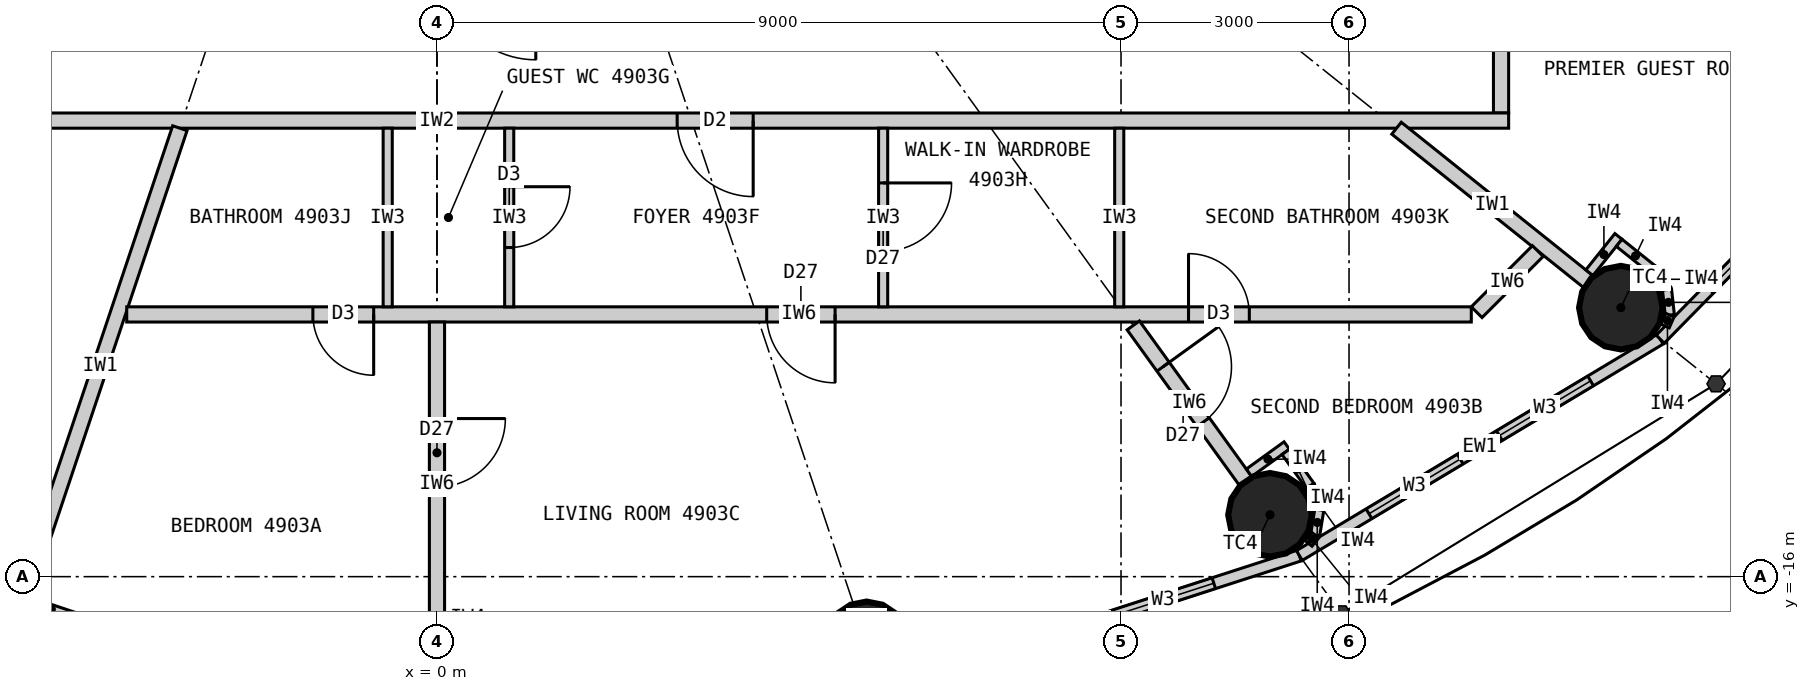
"""IFC4 building model, lengths in metres.
Left out: names, types, materials, properties, quantities, classifications, styles, units other than length and angle.
Written with IfcOpenShell. Run it as: python <this file> out.ifc"""

import sys

from ifc_helpers import new_model, si_unit, direction, frame, frame_2d, origin, origin_2d, place, context, subcontext, project, spatial, rectangle, circle, extrude, clip, halfspace, element, fill, save


model = new_model("IFC4")
c1 = context("Model", 3, precision=1e-05, world=origin(), true_north=direction((0.0, 1.0)))
c2 = subcontext(c1, "Body", "Model", "MODEL_VIEW")
j1 = project(units=[si_unit("LENGTHUNIT", "METRE"), si_unit("PLANEANGLEUNIT", "RADIAN")], contexts=[c1])
p1 = place(None, origin())
s1 = spatial("IfcSite", under=j1, at=p1, CompositionType="ELEMENT")
p2 = place(p1, origin())
s2 = spatial("IfcBuilding", under=s1, at=p2, CompositionType="ELEMENT")
p3 = place(p2, frame((0.0, 0.0, 183.0)))
s3 = spatial("IfcBuildingStorey", under=s2, at=p3, CompositionType="ELEMENT", Elevation=183.0)
for number, where, z_axis, x_axis in (
    (1, (5.653, -16.877, 0.0), (0.0, 0.0, 1.0), (1.0, 0.0, 0.0)),
    (2, (10.96, -15.186, 0.0), (0.0, 0.0, 1.0), (1.0, 0.0, 0.0)),
    (3, (15.576, -12.461, 0.0), (0.0, 0.0, 1.0), (1.0, 0.0, 0.0)),
):
    element("IfcColumn", number, at=place(p3, frame(where, z_axis=z_axis, x_axis=x_axis)), inside=s3, PredefinedType="COLUMN", context=c2, shape_type="Clipping", body=[
        clip(extrude(circle(Radius=0.55, at=origin_2d()), origin(), (0.0, 0.0, 1.0), 3.3), halfspace(frame((0.0, 0.0, 2.25), z_axis=(0.0, 0.0, 1.0), x_axis=(1.0, 0.0, 0.0)), False)),
    ])
p4 = place(p3, frame((5.86, -17.497, 0.0), z_axis=(0.0, 0.0, 1.0), x_axis=(0.951432482129, 0.307857486429, 0.0)))
e4 = element("IfcWall", 4, at=p4, inside=s3, PredefinedType="ELEMENTEDWALL", context=c2, shape_type="SweptSolid", body=[
    extrude(rectangle(XDim=5.766, YDim=0.15, at=frame_2d((2.883, 0.0))), origin(), (0.0, 0.0, 1.0), 3.05),
])
p5 = place(p4, frame((1.183, 0.0, 0.9)))
e5 = element("IfcOpeningElement", 5, at=p5, cuts=e4, PredefinedType="OPENING", context=c2, shape_type="SweptSolid", body=[
    extrude(rectangle(XDim=1.4, YDim=1.9, at=frame_2d((0.7, 0.95))), frame((0.0, 0.085, 0.0), z_axis=(0.0, -1.0, 0.0), x_axis=(1.0, 0.0, 0.0)), (0.0, 0.0, 1.0), 0.17),
])
p6 = place(p4, frame((3.183, 0.0, 0.9)))
e6 = element("IfcOpeningElement", 6, at=p6, cuts=e4, PredefinedType="OPENING", context=c2, shape_type="SweptSolid", body=[
    extrude(rectangle(XDim=1.4, YDim=1.9, at=frame_2d((0.7, 0.95))), frame((0.0, 0.085, 0.0), z_axis=(0.0, -1.0, 0.0), x_axis=(1.0, 0.0, 0.0)), (0.0, 0.0, 1.0), 0.17),
])
p7 = place(p3, frame((11.346, -15.722, 0.0), z_axis=(0.0, 0.0, 1.0), x_axis=(0.857695199231, 0.514158482587, 0.0)))
e7 = element("IfcWall", 7, at=p7, inside=s3, PredefinedType="ELEMENTEDWALL", context=c2, shape_type="SweptSolid", body=[
    extrude(rectangle(XDim=5.536, YDim=0.15, at=frame_2d((2.768, 0.0))), origin(), (0.0, 0.0, 1.0), 3.05),
])
p8 = place(p7, frame((1.068, 0.0, 0.9)))
e8 = element("IfcOpeningElement", 8, at=p8, cuts=e7, PredefinedType="OPENING", context=c2, shape_type="SweptSolid", body=[
    extrude(rectangle(XDim=1.4, YDim=1.9, at=frame_2d((0.7, 0.95))), frame((0.0, 0.085, 0.0), z_axis=(0.0, -1.0, 0.0), x_axis=(1.0, 0.0, 0.0)), (0.0, 0.0, 1.0), 0.17),
])
p9 = place(p7, frame((3.068, 0.0, 0.9)))
e9 = element("IfcOpeningElement", 9, at=p9, cuts=e7, PredefinedType="OPENING", context=c2, shape_type="SweptSolid", body=[
    extrude(rectangle(XDim=1.4, YDim=1.9, at=frame_2d((0.7, 0.95))), frame((0.0, 0.085, 0.0), z_axis=(0.0, -1.0, 0.0), x_axis=(1.0, 0.0, 0.0)), (0.0, 0.0, 1.0), 0.17),
])
p10 = place(p3, frame((16.095, -12.876, 0.0), z_axis=(0.0, 0.0, 1.0), x_axis=(0.700727467776, 0.71342905457, 0.0)))
e10 = element("IfcWall", 10, at=p10, inside=s3, PredefinedType="ELEMENTEDWALL", context=c2, shape_type="SweptSolid", body=[
    extrude(rectangle(XDim=5.247, YDim=0.15, at=frame_2d((2.624, 0.0))), origin(), (0.0, 0.0, 1.0), 3.05),
])
p11 = place(p10, frame((0.924, 0.0, 0.9)))
e11 = element("IfcOpeningElement", 11, at=p11, cuts=e10, PredefinedType="OPENING", context=c2, shape_type="SweptSolid", body=[
    extrude(rectangle(XDim=1.4, YDim=1.9, at=frame_2d((0.7, 0.95))), frame((0.0, 0.085, 0.0), z_axis=(0.0, -1.0, 0.0), x_axis=(1.0, 0.0, 0.0)), (0.0, 0.0, 1.0), 0.17),
])
p12 = place(p10, frame((2.924, 0.0, 0.9)))
e12 = element("IfcOpeningElement", 12, at=p12, cuts=e10, PredefinedType="OPENING", context=c2, shape_type="SweptSolid", body=[
    extrude(rectangle(XDim=1.4, YDim=1.9, at=frame_2d((0.7, 0.95))), frame((0.0, 0.085, 0.0), z_axis=(0.0, -1.0, 0.0), x_axis=(1.0, 0.0, 0.0)), (0.0, 0.0, 1.0), 0.17),
])
p13 = place(p3, frame((14.0, -9.9, 0.0), z_axis=(0.0, 0.0, 1.0), x_axis=(0.0, 1.0, 0.0)))
e13 = element("IfcWall", 13, at=p13, inside=s3, PredefinedType="PARTITIONING", context=c2, shape_type="SweptSolid", body=[
    extrude(rectangle(XDim=19.8, YDim=0.2, at=frame_2d((9.9, 0.0))), origin(), (0.0, 0.0, 1.0), 3.05),
])
p14 = place(p13, frame((1.1, 0.0, 0.0)))
e14 = element("IfcOpeningElement", 14, at=p14, cuts=e13, PredefinedType="OPENING", context=c2, shape_type="SweptSolid", body=[
    extrude(rectangle(XDim=1.0, YDim=2.2, at=frame_2d((0.5, 1.1))), frame((0.0, 0.11, 0.0), z_axis=(0.0, -1.0, 0.0), x_axis=(1.0, 0.0, 0.0)), (0.0, 0.0, 1.0), 0.22),
])
p15 = place(p13, frame((10.832, 0.0, 0.0)))
e15 = element("IfcOpeningElement", 15, at=p15, cuts=e13, PredefinedType="OPENING", context=c2, shape_type="SweptSolid", body=[
    extrude(rectangle(XDim=1.0, YDim=2.2, at=frame_2d((0.5, 1.1))), frame((0.0, 0.11, 0.0), z_axis=(0.0, -1.0, 0.0), x_axis=(1.0, 0.0, 0.0)), (0.0, 0.0, 1.0), 0.22),
])
p16 = place(p3, frame((14.1, -10.0, 0.0), z_axis=(0.0, 0.0, 1.0), x_axis=(-1.0, 0.0, 0.0)))
e16 = element("IfcWall", 16, at=p16, inside=s3, PredefinedType="PARTITIONING", context=c2, shape_type="SweptSolid", body=[
    extrude(rectangle(XDim=28.2, YDim=0.2, at=frame_2d((14.1, 0.0))), origin(), (0.0, 0.0, 1.0), 3.05),
])
p17 = place(p16, frame((23.165, 0.0, 0.0)))
e17 = element("IfcOpeningElement", 17, at=p17, cuts=e16, PredefinedType="OPENING", context=c2, shape_type="SweptSolid", body=[
    extrude(rectangle(XDim=1.0, YDim=2.2, at=frame_2d((0.5, 1.1))), frame((0.0, 0.11, 0.0), z_axis=(0.0, -1.0, 0.0), x_axis=(1.0, 0.0, 0.0)), (0.0, 0.0, 1.0), 0.22),
])
p18 = place(p16, frame((9.94, 0.0, 0.0)))
e18 = element("IfcOpeningElement", 18, at=p18, cuts=e16, PredefinedType="OPENING", context=c2, shape_type="SweptSolid", body=[
    extrude(rectangle(XDim=1.0, YDim=2.2, at=frame_2d((0.5, 1.1))), frame((0.0, 0.11, 0.0), z_axis=(0.0, -1.0, 0.0), x_axis=(1.0, 0.0, 0.0)), (0.0, 0.0, 1.0), 0.22),
])
p19 = place(p3, frame((-3.383, -10.1, 0.0), z_axis=(0.0, 0.0, 1.0), x_axis=(-0.317615120474, -0.948219718866, 0.0)))
e19 = element("IfcWall", 19, at=p19, inside=s3, PredefinedType="PARTITIONING", context=c2, shape_type="SweptSolid", body=[
    extrude(rectangle(XDim=6.597, YDim=0.2, at=frame_2d((3.299, 0.0))), origin(), (0.0, 0.0, 1.0), 2.15),
])
p20 = place(p3, frame((12.625, -10.1, 0.0), z_axis=(0.0, 0.0, 1.0), x_axis=(0.780876185034, -0.624685827954, 0.0)))
e20 = element("IfcWall", 20, at=p20, inside=s3, PredefinedType="PARTITIONING", context=c2, shape_type="SweptSolid", body=[
    extrude(rectangle(XDim=3.229, YDim=0.2, at=frame_2d((1.615, 0.0))), origin(), (0.0, 0.0, 1.0), 2.25),
])
p21 = place(p3, frame((-4.082, -12.55, 0.0), z_axis=(0.0, 0.0, 1.0), x_axis=(1.0, 0.0, 0.0)))
e21 = element("IfcWall", 21, at=p21, inside=s3, PredefinedType="PARTITIONING", context=c2, shape_type="SweptSolid", body=[
    extrude(rectangle(XDim=17.691, YDim=0.2, at=frame_2d((8.845, 0.0))), origin(), (0.0, 0.0, 1.0), 3.05),
])
p22 = place(p21, frame((2.449, 0.0, 0.0)))
e22 = element("IfcOpeningElement", 22, at=p22, cuts=e21, PredefinedType="OPENING", context=c2, shape_type="SweptSolid", body=[
    extrude(rectangle(XDim=0.8, YDim=2.1, at=frame_2d((0.4, 1.05))), frame((0.0, 0.11, 0.0), z_axis=(0.0, -1.0, 0.0), x_axis=(1.0, 0.0, 0.0)), (0.0, 0.0, 1.0), 0.22),
])
p23 = place(p21, frame((13.97, 0.0, 0.0)))
e23 = element("IfcOpeningElement", 23, at=p23, cuts=e21, PredefinedType="OPENING", context=c2, shape_type="SweptSolid", body=[
    extrude(rectangle(XDim=0.8, YDim=2.1, at=frame_2d((0.4, 1.05))), frame((0.0, 0.11, 0.0), z_axis=(0.0, -1.0, 0.0), x_axis=(1.0, 0.0, 0.0)), (0.0, 0.0, 1.0), 0.22),
])
p24 = place(p21, frame((8.42, 0.0, 0.0)))
e24 = element("IfcOpeningElement", 24, at=p24, cuts=e21, PredefinedType="OPENING", context=c2, shape_type="SweptSolid", body=[
    extrude(rectangle(XDim=0.9, YDim=2.1, at=frame_2d((0.45, 1.05))), frame((0.0, 0.11, 0.0), z_axis=(0.0, -1.0, 0.0), x_axis=(1.0, 0.0, 0.0)), (0.0, 0.0, 1.0), 0.22),
])
p25 = place(p3, frame((13.679, -12.521, 0.0), z_axis=(0.0, 0.0, 1.0), x_axis=(0.707106781187, 0.707106781187, 0.0)))
e25 = element("IfcWall", 25, at=p25, inside=s3, PredefinedType="PARTITIONING", context=c2, shape_type="SweptSolid", body=[
    extrude(rectangle(XDim=1.138, YDim=0.2, at=frame_2d((0.569, 0.0))), origin(), (0.0, 0.0, 1.0), 3.05),
])
p26 = place(p3, frame((0.0, -12.65, 0.0), z_axis=(0.0, 0.0, 1.0), x_axis=(0.0, -1.0, 0.0)))
e26 = element("IfcWall", 26, at=p26, inside=s3, PredefinedType="PARTITIONING", context=c2, shape_type="SweptSolid", body=[
    extrude(rectangle(XDim=4.25, YDim=0.2, at=frame_2d((2.125, 0.0))), origin(), (0.0, 0.0, 1.0), 2.25),
])
p27 = place(p26, frame((1.27, 0.0, 0.0)))
e27 = element("IfcOpeningElement", 27, at=p27, cuts=e26, PredefinedType="OPENING", context=c2, shape_type="SweptSolid", body=[
    extrude(rectangle(XDim=0.9, YDim=2.1, at=frame_2d((0.45, 1.05))), frame((0.0, 0.11, 0.0), z_axis=(0.0, -1.0, 0.0), x_axis=(1.0, 0.0, 0.0)), (0.0, 0.0, 1.0), 0.22),
])
p28 = place(p3, frame((9.162, -12.695, 0.0), z_axis=(0.0, 0.0, 1.0), x_axis=(0.585204311739, -0.810885881935, 0.0)))
e28 = element("IfcWall", 28, at=p28, inside=s3, PredefinedType="PARTITIONING", context=c2, shape_type="SweptSolid", body=[
    extrude(rectangle(XDim=2.523, YDim=0.2, at=frame_2d((1.261, 0.0))), origin(), (0.0, 0.0, 1.0), 2.15),
])
p29 = place(p28, frame((0.67, 0.0, 0.0)))
e29 = element("IfcOpeningElement", 29, at=p29, cuts=e28, PredefinedType="OPENING", context=c2, shape_type="SweptSolid", body=[
    extrude(rectangle(XDim=0.9, YDim=2.1, at=frame_2d((0.45, 1.05))), frame((0.0, 0.11, 0.0), z_axis=(0.0, -1.0, 0.0), x_axis=(1.0, 0.0, 0.0)), (0.0, 0.0, 1.0), 0.22),
])
p30 = place(p3, frame((-0.648, -10.1, 0.0), z_axis=(0.0, 0.0, 1.0), x_axis=(0.0, -1.0, 0.0)))
e30 = element("IfcWall", 30, at=p30, inside=s3, PredefinedType="PARTITIONING", context=c2, shape_type="SweptSolid", body=[
    extrude(rectangle(XDim=2.35, YDim=0.12, at=frame_2d((1.175, 0.0))), origin(), (0.0, 0.0, 1.0), 3.05),
])
p31 = place(p3, frame((0.95, -10.1, 0.0), z_axis=(0.0, 0.0, 1.0), x_axis=(0.0, -1.0, 0.0)))
e31 = element("IfcWall", 31, at=p31, inside=s3, PredefinedType="PARTITIONING", context=c2, shape_type="SweptSolid", body=[
    extrude(rectangle(XDim=2.35, YDim=0.12, at=frame_2d((1.175, 0.0))), origin(), (0.0, 0.0, 1.0), 3.05),
])
p32 = place(p31, frame((0.77, 0.0, 0.0)))
e32 = element("IfcOpeningElement", 32, at=p32, cuts=e31, PredefinedType="OPENING", context=c2, shape_type="SweptSolid", body=[
    extrude(rectangle(XDim=0.8, YDim=2.1, at=frame_2d((0.4, 1.05))), frame((0.0, 0.07, 0.0), z_axis=(0.0, -1.0, 0.0), x_axis=(1.0, 0.0, 0.0)), (0.0, 0.0, 1.0), 0.14),
])
p33 = place(p3, frame((5.87, -10.1, 0.0), z_axis=(0.0, 0.0, 1.0), x_axis=(0.0, -1.0, 0.0)))
e33 = element("IfcWall", 33, at=p33, inside=s3, PredefinedType="PARTITIONING", context=c2, shape_type="SweptSolid", body=[
    extrude(rectangle(XDim=2.35, YDim=0.12, at=frame_2d((1.175, 0.0))), origin(), (0.0, 0.0, 1.0), 3.05),
])
p34 = place(p33, frame((0.72, 0.0, 0.0)))
e34 = element("IfcOpeningElement", 34, at=p34, cuts=e33, PredefinedType="OPENING", context=c2, shape_type="SweptSolid", body=[
    extrude(rectangle(XDim=0.9, YDim=2.1, at=frame_2d((0.45, 1.05))), frame((0.0, 0.07, 0.0), z_axis=(0.0, -1.0, 0.0), x_axis=(1.0, 0.0, 0.0)), (0.0, 0.0, 1.0), 0.14),
])
p35 = place(p3, frame((8.977, -10.1, 0.0), z_axis=(0.0, 0.0, 1.0), x_axis=(0.0, -1.0, 0.0)))
e35 = element("IfcWall", 35, at=p35, inside=s3, PredefinedType="PARTITIONING", context=c2, shape_type="SweptSolid", body=[
    extrude(rectangle(XDim=2.35, YDim=0.12, at=frame_2d((1.175, 0.0))), origin(), (0.0, 0.0, 1.0), 3.05),
])
p36 = place(p3, frame((-5.364, -16.331, 0.0), z_axis=(0.0, 0.0, 1.0), x_axis=(0.948283770087, -0.317423835572, 0.0)))
e36 = element("IfcWall", 36, at=p36, inside=s3, PredefinedType="PARTITIONING", context=c2, shape_type="SweptSolid", body=[
    extrude(rectangle(XDim=0.612, YDim=0.12, at=frame_2d((0.306, 0.0))), origin(), (0.0, 0.0, 1.0), 3.05),
])
p37 = place(p3, frame((10.684, -14.633, 0.0), z_axis=(0.0, 0.0, 1.0), x_axis=(0.810921075692, 0.585155542568, 0.0)))
e37 = element("IfcWall", 37, at=p37, inside=s3, PredefinedType="PARTITIONING", context=c2, shape_type="SweptSolid", body=[
    extrude(rectangle(XDim=0.612, YDim=0.12, at=frame_2d((0.306, 0.0))), origin(), (0.0, 0.0, 1.0), 3.05),
])
p38 = place(p3, frame((11.167, -14.359, 0.0), z_axis=(0.0, 0.0, 1.0), x_axis=(0.585263549799, -0.810843127415, 0.0)))
e38 = element("IfcWall", 38, at=p38, inside=s3, PredefinedType="PARTITIONING", context=c2, shape_type="SweptSolid", body=[
    extrude(rectangle(XDim=0.55, YDim=0.12, at=frame_2d((0.275, 0.0))), origin(), (0.0, 0.0, 1.0), 3.05),
])
for number, where, z_axis, x_axis in (
    (39, (11.489, -14.804, 0.0), (0.0, 0.0, 1.0), (0.356, -0.935, 0.0)),
    (40, (11.609, -15.12, 0.0), (0.0, 0.0, 1.0), (-0.16, -0.987, 0.0)),
):
    element("IfcWall", number, at=place(p3, frame(where, z_axis=z_axis, x_axis=x_axis)), inside=s3, PredefinedType="PARTITIONING", context=c2, shape_type="SweptSolid", body=[
        extrude(rectangle(XDim=0.338, YDim=0.12, at=frame_2d((0.169, 0.0))), origin(), (0.0, 0.0, 1.0), 3.05),
    ])
p39 = place(p3, frame((11.555, -15.453, 0.0), z_axis=(0.0, 0.0, 1.0), x_axis=(-0.631711901025, -0.775203246964, 0.0)))
e41 = element("IfcWall", 41, at=p39, inside=s3, PredefinedType="PARTITIONING", context=c2, shape_type="SweptSolid", body=[
    extrude(rectangle(XDim=0.139, YDim=0.12, at=frame_2d((0.07, 0.0))), origin(), (0.0, 0.0, 1.0), 3.05),
])
p40 = place(p3, frame((15.162, -12.002, 0.0), z_axis=(0.0, 0.0, 1.0), x_axis=(0.624597762427, 0.780946627607, 0.0)))
e42 = element("IfcWall", 42, at=p40, inside=s3, PredefinedType="PARTITIONING", context=c2, shape_type="SweptSolid", body=[
    extrude(rectangle(XDim=0.612, YDim=0.12, at=frame_2d((0.306, 0.0))), origin(), (0.0, 0.0, 1.0), 3.05),
])
p41 = place(p3, frame((15.554, -11.608, 0.0), z_axis=(0.0, 0.0, 1.0), x_axis=(0.780695577787, -0.624911525597, 0.0)))
e43 = element("IfcWall", 43, at=p41, inside=s3, PredefinedType="PARTITIONING", context=c2, shape_type="SweptSolid", body=[
    extrude(rectangle(XDim=0.55, YDim=0.12, at=frame_2d((0.275, 0.0))), origin(), (0.0, 0.0, 1.0), 3.05),
])
p42 = place(p3, frame((15.984, -11.952, 0.0), z_axis=(0.0, 0.0, 1.0), x_axis=(0.592335221171, -0.805691619517, 0.0)))
e44 = element("IfcWall", 44, at=p42, inside=s3, PredefinedType="PARTITIONING", context=c2, shape_type="SweptSolid", body=[
    extrude(rectangle(XDim=0.338, YDim=0.12, at=frame_2d((0.169, 0.0))), origin(), (0.0, 0.0, 1.0), 3.05),
])
p43 = place(p3, frame((16.184, -12.224, 0.0), z_axis=(0.0, 0.0, 1.0), x_axis=(0.110669692975, -0.993857242795, 0.0)))
e45 = element("IfcWall", 45, at=p43, inside=s3, PredefinedType="PARTITIONING", context=c2, shape_type="SweptSolid", body=[
    extrude(rectangle(XDim=0.337, YDim=0.12, at=frame_2d((0.169, 0.0))), origin(), (0.0, 0.0, 1.0), 3.05),
])
p44 = place(p3, frame((16.221, -12.559, 0.0), z_axis=(0.0, 0.0, 1.0), x_axis=(-0.401064416249, -0.916049853457, 0.0)))
e46 = element("IfcWall", 46, at=p44, inside=s3, PredefinedType="PARTITIONING", context=c2, shape_type="SweptSolid", body=[
    extrude(rectangle(XDim=0.156, YDim=0.12, at=frame_2d((0.078, 0.0))), origin(), (0.0, 0.0, 1.0), 3.05),
])
p45 = place(p6, origin())
e47 = element("IfcWindow", 47, at=p45, inside=s3, PartitioningType="SINGLE_PANEL", PredefinedType="WINDOW", context=c2, shape_type="SweptSolid", body=[
    extrude(rectangle(XDim=1.4, YDim=1.9, at=frame_2d((0.7, 0.95))), frame((0.0, 0.03, 0.0), z_axis=(0.0, -1.0, 0.0), x_axis=(1.0, 0.0, 0.0)), (0.0, 0.0, 1.0), 0.06),
])
fill(e6, e47)
p46 = place(p8, origin())
e48 = element("IfcWindow", 48, at=p46, inside=s3, PartitioningType="SINGLE_PANEL", PredefinedType="WINDOW", context=c2, shape_type="SweptSolid", body=[
    extrude(rectangle(XDim=1.4, YDim=1.9, at=frame_2d((0.7, 0.95))), frame((0.0, 0.03, 0.0), z_axis=(0.0, -1.0, 0.0), x_axis=(1.0, 0.0, 0.0)), (0.0, 0.0, 1.0), 0.06),
])
fill(e8, e48)
p47 = place(p9, origin())
e49 = element("IfcWindow", 49, at=p47, inside=s3, PartitioningType="SINGLE_PANEL", PredefinedType="WINDOW", context=c2, shape_type="SweptSolid", body=[
    extrude(rectangle(XDim=1.4, YDim=1.9, at=frame_2d((0.7, 0.95))), frame((0.0, 0.03, 0.0), z_axis=(0.0, -1.0, 0.0), x_axis=(1.0, 0.0, 0.0)), (0.0, 0.0, 1.0), 0.06),
])
fill(e9, e49)
p48 = place(p11, origin())
e50 = element("IfcWindow", 50, at=p48, inside=s3, PartitioningType="SINGLE_PANEL", PredefinedType="WINDOW", context=c2, shape_type="SweptSolid", body=[
    extrude(rectangle(XDim=1.4, YDim=1.9, at=frame_2d((0.7, 0.95))), frame((0.0, 0.03, 0.0), z_axis=(0.0, -1.0, 0.0), x_axis=(1.0, 0.0, 0.0)), (0.0, 0.0, 1.0), 0.06),
])
fill(e11, e50)
p49 = place(p18, origin())
e51 = element("IfcDoor", 51, at=p49, inside=s3, OperationType="SINGLE_SWING_LEFT", PredefinedType="DOOR", context=c2, shape_type="SweptSolid", body=[
    extrude(rectangle(XDim=1.0, YDim=2.2, at=frame_2d((0.5, 1.1))), frame((0.0, 0.025, 0.0), z_axis=(0.0, -1.0, 0.0), x_axis=(1.0, 0.0, 0.0)), (0.0, 0.0, 1.0), 0.05),
])
fill(e18, e51)
p50 = place(p22, origin())
e52 = element("IfcDoor", 52, at=p50, inside=s3, OperationType="SINGLE_SWING_RIGHT", PredefinedType="DOOR", context=c2, shape_type="SweptSolid", body=[
    extrude(rectangle(XDim=0.8, YDim=2.1, at=frame_2d((0.4, 1.05))), frame((0.0, 0.025, 0.0), z_axis=(0.0, -1.0, 0.0), x_axis=(1.0, 0.0, 0.0)), (0.0, 0.0, 1.0), 0.05),
])
fill(e22, e52)
p51 = place(p32, origin())
e53 = element("IfcDoor", 53, at=p51, inside=s3, OperationType="SINGLE_SWING_LEFT", PredefinedType="DOOR", context=c2, shape_type="SweptSolid", body=[
    extrude(rectangle(XDim=0.8, YDim=2.1, at=frame_2d((0.4, 1.05))), frame((0.0, 0.025, 0.0), z_axis=(0.0, -1.0, 0.0), x_axis=(1.0, 0.0, 0.0)), (0.0, 0.0, 1.0), 0.05),
])
fill(e32, e53)
p52 = place(p34, origin())
e54 = element("IfcDoor", 54, at=p52, inside=s3, OperationType="SINGLE_SWING_LEFT", PredefinedType="DOOR", context=c2, shape_type="SweptSolid", body=[
    extrude(rectangle(XDim=0.9, YDim=2.1, at=frame_2d((0.45, 1.05))), frame((0.0, 0.025, 0.0), z_axis=(0.0, -1.0, 0.0), x_axis=(1.0, 0.0, 0.0)), (0.0, 0.0, 1.0), 0.05),
])
fill(e34, e54)
p53 = place(p23, origin())
e55 = element("IfcDoor", 55, at=p53, inside=s3, OperationType="SINGLE_SWING_LEFT", PredefinedType="DOOR", context=c2, shape_type="SweptSolid", body=[
    extrude(rectangle(XDim=0.8, YDim=2.1, at=frame_2d((0.4, 1.05))), frame((0.0, 0.025, 0.0), z_axis=(0.0, -1.0, 0.0), x_axis=(1.0, 0.0, 0.0)), (0.0, 0.0, 1.0), 0.05),
])
fill(e23, e55)
p54 = place(p24, origin())
e56 = element("IfcDoor", 56, at=p54, inside=s3, OperationType="SINGLE_SWING_RIGHT", PredefinedType="DOOR", context=c2, shape_type="SweptSolid", body=[
    extrude(rectangle(XDim=0.9, YDim=2.1, at=frame_2d((0.45, 1.05))), frame((0.0, 0.025, 0.0), z_axis=(0.0, -1.0, 0.0), x_axis=(1.0, 0.0, 0.0)), (0.0, 0.0, 1.0), 0.05),
])
fill(e24, e56)
p55 = place(p27, origin())
e57 = element("IfcDoor", 57, at=p55, inside=s3, OperationType="SINGLE_SWING_LEFT", PredefinedType="DOOR", context=c2, shape_type="SweptSolid", body=[
    extrude(rectangle(XDim=0.9, YDim=2.1, at=frame_2d((0.45, 1.05))), frame((0.0, 0.025, 0.0), z_axis=(0.0, -1.0, 0.0), x_axis=(1.0, 0.0, 0.0)), (0.0, 0.0, 1.0), 0.05),
])
fill(e27, e57)
p56 = place(p29, origin())
e58 = element("IfcDoor", 58, at=p56, inside=s3, OperationType="SINGLE_SWING_LEFT", PredefinedType="DOOR", context=c2, shape_type="SweptSolid", body=[
    extrude(rectangle(XDim=0.9, YDim=2.1, at=frame_2d((0.45, 1.05))), frame((0.0, 0.025, 0.0), z_axis=(0.0, -1.0, 0.0), x_axis=(1.0, 0.0, 0.0)), (0.0, 0.0, 1.0), 0.05),
])
fill(e29, e58)
save(model, sys.argv[1])
